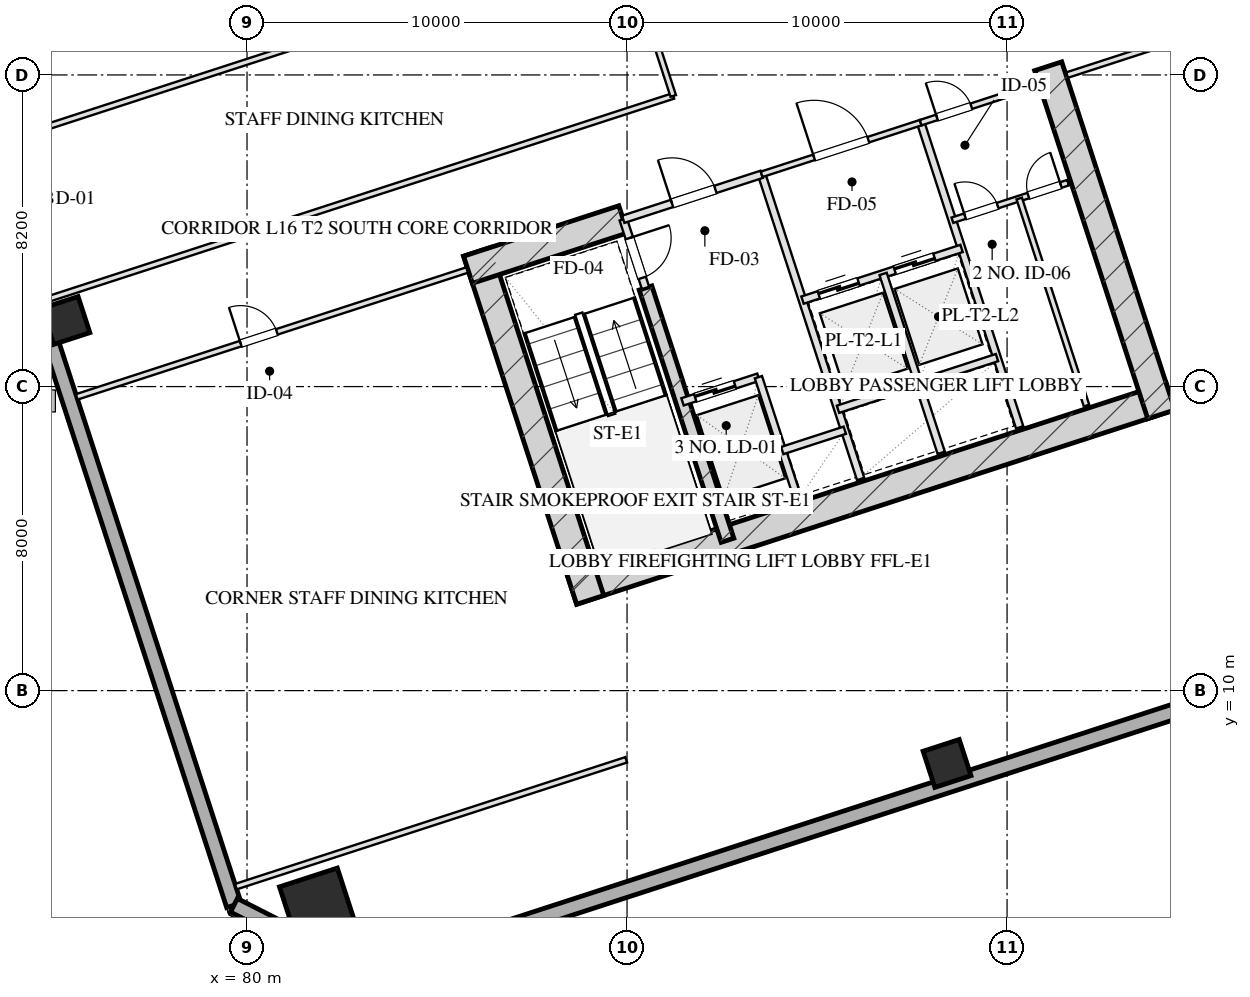
"""IFC4 building model, lengths in metres.
Left out: names, types, materials, properties, quantities, classifications, styles, units other than length and angle.
Written with IfcOpenShell. Run it as: python <this file> out.ifc"""

import sys

from ifc_helpers import new_model, si_unit, direction, frame, frame_2d, origin, origin_2d, place, context, subcontext, project, spatial, rectangle, hollow_rectangle, extrude, element, fill, save


model = new_model("IFC4")
c1 = context("Model", 3, precision=1e-05, world=origin(), true_north=direction((0.0, 1.0)))
c2 = subcontext(c1, "Body", "Model", "MODEL_VIEW")
j1 = project(units=[si_unit("LENGTHUNIT", "METRE"), si_unit("PLANEANGLEUNIT", "RADIAN")], contexts=[c1])
p1 = place(None, origin())
s1 = spatial("IfcSite", under=j1, at=p1, CompositionType="ELEMENT")
p2 = place(p1, origin())
s2 = spatial("IfcBuilding", under=s1, at=p2, CompositionType="ELEMENT")
p3 = place(p2, frame((0.0, 0.0, 67.85)))
s3 = spatial("IfcBuildingStorey", under=s2, at=p3, CompositionType="ELEMENT", Elevation=67.85)
p4 = place(p3, frame((88.559, 12.629, 0.0), z_axis=(0.0, 0.0, 1.0), x_axis=(0.951056072937, 0.309018358888, 0.0)))
e1 = element("IfcWall", 1, at=p4, inside=s3, PredefinedType="SHEAR", context=c2, shape_type="SweptSolid", body=[
    extrude(rectangle(XDim=16.55, YDim=0.75, at=frame_2d((8.275, 0.0))), origin(), (0.0, 0.0, 1.0), 3.45),
])
p5 = place(p3, frame((86.055, 21.546, 0.0), z_axis=(0.0, 0.0, 1.0), x_axis=(0.309023585745, -0.951054374604, 0.0)))
e2 = element("IfcWall", 2, at=p5, inside=s3, PredefinedType="SHEAR", context=c2, shape_type="SweptSolid", body=[
    extrude(rectangle(XDim=9.63, YDim=0.75, at=frame_2d((4.815, 0.0))), origin(), (0.0, 0.0, 1.0), 3.45),
])
p6 = place(p3, frame((101.082, 26.429, 0.0), z_axis=(0.0, 0.0, 1.0), x_axis=(0.309016134813, -0.951056795583, 0.0)))
e3 = element("IfcWall", 3, at=p6, inside=s3, PredefinedType="SHEAR", context=c2, shape_type="SweptSolid", body=[
    extrude(rectangle(XDim=9.63, YDim=0.75, at=frame_2d((4.815, 0.0))), origin(), (0.0, 0.0, 1.0), 3.45),
])
p7 = place(p3, frame((90.486, 20.594, 0.0), z_axis=(0.0, 0.0, 1.0), x_axis=(0.309020428229, -0.951055400562, 0.0)))
e4 = element("IfcWall", 4, at=p7, inside=s3, PredefinedType="SHEAR", context=c2, shape_type="SweptSolid", body=[
    extrude(rectangle(XDim=6.98, YDim=0.35, at=frame_2d((3.49, 0.0))), origin(), (0.0, 0.0, 1.0), 3.45),
])
p8 = place(p3, frame((85.814, 21.074, 0.0), z_axis=(0.0, 0.0, 1.0), x_axis=(0.95106580992, 0.308988390074, 0.0)))
e5 = element("IfcWall", 5, at=p8, inside=s3, PredefinedType="SHEAR", context=c2, shape_type="SweptSolid", body=[
    extrude(rectangle(XDim=4.295, YDim=0.75, at=frame_2d((2.147, 0.0))), origin(), (0.0, 0.0, 1.0), 3.45),
])
p9 = place(p3, frame((81.863, 4.323, 0.0), z_axis=(0.0, 0.0, 1.0), x_axis=(0.951056516295, 0.309016994375, 0.0)))
e6 = element("IfcColumn", 6, at=p9, inside=s3, PredefinedType="COLUMN", context=c2, shape_type="SweptSolid", body=[
    extrude(hollow_rectangle(XDim=1.6, YDim=1.6, WallThickness=0.055, at=origin_2d()), origin(), (0.0, 0.0, 1.0), 3.451),
])
for number, where, z_axis, x_axis in (
    (7, (75.234, 19.739, 0.0), (0.0, 0.0, 1.0), (0.951, 0.309, 0.0)),
    (8, (98.421, 8.084, 0.0), (0.0, 0.0, 1.0), (0.951, 0.309, 0.0)),
):
    element("IfcColumn", number, at=place(p3, frame(where, z_axis=z_axis, x_axis=x_axis)), inside=s3, PredefinedType="COLUMN", context=c2, shape_type="SweptSolid", body=[
        extrude(hollow_rectangle(XDim=1.0, YDim=1.0, WallThickness=0.036, at=origin_2d()), origin(), (0.0, 0.0, 1.0), 3.451),
    ])
p10 = place(p3, frame((79.655, 4.352, 0.0), z_axis=(0.0, 0.0, 1.0), x_axis=(-0.309014526607, 0.951057318118, 0.0)))
e9 = element("IfcWall", 9, at=p10, inside=s3, PredefinedType="SOLIDWALL", context=c2, shape_type="SweptSolid", body=[
    extrude(rectangle(XDim=50.0, YDim=0.4, at=frame_2d((25.0, 0.0))), origin(), (0.0, 0.0, 1.0), 2.61),
])
p11 = place(p10, frame((30.15, 0.0, 0.75)))
e10 = element("IfcOpeningElement", 10, at=p11, cuts=e9, PredefinedType="OPENING", context=c2, shape_type="SweptSolid", body=[
    extrude(rectangle(XDim=2.5, YDim=1.46, at=frame_2d((1.25, 0.73))), frame((0.0, 0.21, 0.0), z_axis=(0.0, -1.0, 0.0), x_axis=(1.0, 0.0, 0.0)), (0.0, 0.0, 1.0), 0.42),
])
p12 = place(p10, frame((18.65, 0.0, 0.0)))
e11 = element("IfcOpeningElement", 11, at=p12, cuts=e9, PredefinedType="OPENING", context=c2, shape_type="SweptSolid", body=[
    extrude(rectangle(XDim=1.1, YDim=2.15, at=frame_2d((0.55, 1.075))), frame((0.0, 0.21, 0.0), z_axis=(0.0, -1.0, 0.0), x_axis=(1.0, 0.0, 0.0)), (0.0, 0.0, 1.0), 0.42),
])
p13 = place(p3, frame((100.345, 63.648, 0.0), z_axis=(0.0, 0.0, 1.0), x_axis=(0.309014526607, -0.951057318118, 0.0)))
e12 = element("IfcWall", 12, at=p13, inside=s3, PredefinedType="SOLIDWALL", context=c2, shape_type="SweptSolid", body=[
    extrude(rectangle(XDim=50.0, YDim=0.4, at=frame_2d((25.0, 0.0))), origin(), (0.0, 0.0, 1.0), 2.61),
])
p14 = place(p13, frame((21.15, 0.0, 0.75)))
e13 = element("IfcOpeningElement", 13, at=p14, cuts=e12, PredefinedType="OPENING", context=c2, shape_type="SweptSolid", body=[
    extrude(rectangle(XDim=2.5, YDim=1.46, at=frame_2d((1.25, 0.73))), frame((0.0, 0.21, 0.0), z_axis=(0.0, -1.0, 0.0), x_axis=(1.0, 0.0, 0.0)), (0.0, 0.0, 1.0), 0.42),
])
p15 = place(p13, frame((17.35, 0.0, 0.75)))
e14 = element("IfcOpeningElement", 14, at=p15, cuts=e12, PredefinedType="OPENING", context=c2, shape_type="SweptSolid", body=[
    extrude(rectangle(XDim=2.5, YDim=1.46, at=frame_2d((1.25, 0.73))), frame((0.0, 0.21, 0.0), z_axis=(0.0, -1.0, 0.0), x_axis=(1.0, 0.0, 0.0)), (0.0, 0.0, 1.0), 0.42),
])
p16 = place(p13, frame((30.255, 0.0, 0.0)))
e15 = element("IfcOpeningElement", 15, at=p16, cuts=e12, PredefinedType="OPENING", context=c2, shape_type="SweptSolid", body=[
    extrude(rectangle(XDim=1.1, YDim=2.15, at=frame_2d((0.55, 1.075))), frame((0.0, 0.21, 0.0), z_axis=(0.0, -1.0, 0.0), x_axis=(1.0, 0.0, 0.0)), (0.0, 0.0, 1.0), 0.42),
])
p17 = place(p3, frame((113.998, 12.567, 0.0), z_axis=(0.0, 0.0, 1.0), x_axis=(-0.951055939317, -0.309018770125, 0.0)))
e16 = element("IfcWall", 16, at=p17, inside=s3, PredefinedType="SOLIDWALL", context=c2, shape_type="SweptSolid", body=[
    extrude(rectangle(XDim=32.4, YDim=0.4, at=frame_2d((16.2, 0.0))), origin(), (0.0, 0.0, 1.0), 2.61),
])
p18 = place(p3, frame((83.184, 2.554, 0.0), z_axis=(0.0, 0.0, 1.0), x_axis=(-0.890998089617, 0.454007053137, 0.0)))
e17 = element("IfcWall", 17, at=p18, inside=s3, PredefinedType="SOLIDWALL", context=c2, shape_type="SweptSolid", body=[
    extrude(rectangle(XDim=3.96, YDim=0.4, at=frame_2d((1.98, 0.0))), origin(), (0.0, 0.0, 1.0), 2.61),
])
p19 = place(p3, frame((89.899, 22.401, 0.0), z_axis=(0.0, 0.0, 1.0), x_axis=(0.308932062672, -0.951084108086, 0.0)))
e18 = element("IfcWall", 18, at=p19, inside=s3, PredefinedType="PARTITIONING", context=c2, shape_type="SweptSolid", body=[
    extrude(rectangle(XDim=1.9, YDim=0.2, at=frame_2d((0.95, 0.0))), origin(), (0.0, 0.0, 1.0), 3.175),
])
p20 = place(p19, frame((0.52, 0.0, 0.0)))
e19 = element("IfcOpeningElement", 19, at=p20, cuts=e18, PredefinedType="OPENING", context=c2, shape_type="SweptSolid", body=[
    extrude(rectangle(XDim=1.1, YDim=2.05, at=frame_2d((0.55, 1.025))), frame((0.0, 0.11, 0.0), z_axis=(0.0, -1.0, 0.0), x_axis=(1.0, 0.0, 0.0)), (0.0, 0.0, 1.0), 0.22),
])
p21 = place(p3, frame((93.542, 23.585, 0.0), z_axis=(0.0, 0.0, 1.0), x_axis=(0.309042196757, -0.951048327176, 0.0)))
e20 = element("IfcWall", 20, at=p21, inside=s3, PredefinedType="PARTITIONING", context=c2, shape_type="SweptSolid", body=[
    extrude(rectangle(XDim=8.43, YDim=0.2, at=frame_2d((4.215, 0.0))), origin(), (0.0, 0.0, 1.0), 3.175),
])
p22 = place(p3, frame((89.899, 22.401, 0.0), z_axis=(0.0, 0.0, 1.0), x_axis=(0.951046716504, 0.309047153403, 0.0)))
e21 = element("IfcWall", 21, at=p22, inside=s3, PredefinedType="PARTITIONING", context=c2, shape_type="SweptSolid", body=[
    extrude(rectangle(XDim=3.83, YDim=0.2, at=frame_2d((1.915, 0.0))), origin(), (0.0, 0.0, 1.0), 3.175),
])
p23 = place(p22, frame((1.35, 0.0, 0.0)))
e22 = element("IfcOpeningElement", 22, at=p23, cuts=e21, PredefinedType="OPENING", context=c2, shape_type="SweptSolid", body=[
    extrude(rectangle(XDim=1.2, YDim=2.05, at=frame_2d((0.6, 1.025))), frame((0.0, 0.11, 0.0), z_axis=(0.0, -1.0, 0.0), x_axis=(1.0, 0.0, 0.0)), (0.0, 0.0, 1.0), 0.22),
])
p24 = place(p3, frame((91.46, 17.598, 0.0), z_axis=(0.0, 0.0, 1.0), x_axis=(0.951062257173, 0.308999325213, 0.0)))
e23 = element("IfcWall", 23, at=p24, inside=s3, PredefinedType="PARTITIONING", context=c2, shape_type="SweptSolid", body=[
    extrude(rectangle(XDim=2.1, YDim=0.2, at=frame_2d((1.05, 0.0))), origin(), (0.0, 0.0, 1.0), 3.175),
])
p25 = place(p24, frame((0.35, 0.0, 0.0)))
e24 = element("IfcOpeningElement", 24, at=p25, cuts=e23, PredefinedType="OPENING", context=c2, shape_type="SweptSolid", body=[
    extrude(rectangle(XDim=1.1, YDim=2.05, at=frame_2d((0.55, 1.025))), frame((0.0, 0.11, 0.0), z_axis=(0.0, -1.0, 0.0), x_axis=(1.0, 0.0, 0.0)), (0.0, 0.0, 1.0), 0.22),
])
p26 = place(p3, frame((93.457, 18.247, 0.0), z_axis=(0.0, 0.0, 1.0), x_axis=(0.3089935693, -0.951064127245, 0.0)))
e25 = element("IfcWall", 25, at=p26, inside=s3, PredefinedType="PARTITIONING", context=c2, shape_type="SweptSolid", body=[
    extrude(rectangle(XDim=3.7, YDim=0.2, at=frame_2d((1.85, 0.0))), origin(), (0.0, 0.0, 1.0), 3.175),
])
p27 = place(p3, frame((94.084, 16.317, 0.0), z_axis=(0.0, 0.0, 1.0), x_axis=(0.951041328149, 0.309063734775, 0.0)))
e26 = element("IfcWall", 26, at=p27, inside=s3, PredefinedType="PARTITIONING", context=c2, shape_type="SweptSolid", body=[
    extrude(rectangle(XDim=1.73, YDim=0.2, at=frame_2d((0.865, 0.0))), origin(), (0.0, 0.0, 1.0), 3.175),
])
p28 = place(p3, frame((97.727, 24.944, 0.0), z_axis=(0.0, 0.0, 1.0), x_axis=(0.309016001439, -0.951056838919, 0.0)))
e27 = element("IfcWall", 27, at=p28, inside=s3, PredefinedType="PARTITIONING", context=c2, shape_type="SweptSolid", body=[
    extrude(rectangle(XDim=8.43, YDim=0.2, at=frame_2d((4.215, 0.0))), origin(), (0.0, 0.0, 1.0), 3.175),
])
p29 = place(p3, frame((93.542, 23.585, 0.0), z_axis=(0.0, 0.0, 1.0), x_axis=(0.951063829732, 0.308994485023, 0.0)))
e28 = element("IfcWall", 28, at=p29, inside=s3, PredefinedType="PARTITIONING", context=c2, shape_type="SweptSolid", body=[
    extrude(rectangle(XDim=4.4, YDim=0.15, at=frame_2d((2.2, 0.0))), origin(), (0.0, 0.0, 1.0), 3.175),
])
p30 = place(p29, frame((1.45, 0.0, 0.0)))
e29 = element("IfcOpeningElement", 29, at=p30, cuts=e28, PredefinedType="OPENING", context=c2, shape_type="SweptSolid", body=[
    extrude(rectangle(XDim=1.5, YDim=2.05, at=frame_2d((0.75, 1.025))), frame((0.0, 0.085, 0.0), z_axis=(0.0, -1.0, 0.0), x_axis=(1.0, 0.0, 0.0)), (0.0, 0.0, 1.0), 0.17),
])
p31 = place(p3, frame((94.617, 20.275, 0.0), z_axis=(0.0, 0.0, 1.0), x_axis=(0.951058531764, 0.30901079133, 0.0)))
e30 = element("IfcWall", 30, at=p31, inside=s3, PredefinedType="PARTITIONING", context=c2, shape_type="SweptSolid", body=[
    extrude(rectangle(XDim=4.4, YDim=0.2, at=frame_2d((2.2, 0.0))), origin(), (0.0, 0.0, 1.0), 3.175),
])
p32 = place(p31, frame((0.45, 0.0, 0.0)))
e31 = element("IfcOpeningElement", 31, at=p32, cuts=e30, PredefinedType="OPENING", context=c2, shape_type="SweptSolid", body=[
    extrude(rectangle(XDim=1.1, YDim=2.05, at=frame_2d((0.55, 1.025))), frame((0.0, 0.11, 0.0), z_axis=(0.0, -1.0, 0.0), x_axis=(1.0, 0.0, 0.0)), (0.0, 0.0, 1.0), 0.22),
])
p33 = place(p31, frame((2.55, 0.0, 0.0)))
e32 = element("IfcOpeningElement", 32, at=p33, cuts=e30, PredefinedType="OPENING", context=c2, shape_type="SweptSolid", body=[
    extrude(rectangle(XDim=1.1, YDim=2.05, at=frame_2d((0.55, 1.025))), frame((0.0, 0.11, 0.0), z_axis=(0.0, -1.0, 0.0), x_axis=(1.0, 0.0, 0.0)), (0.0, 0.0, 1.0), 0.22),
])
p34 = place(p3, frame((96.738, 20.964, 0.0), z_axis=(0.0, 0.0, 1.0), x_axis=(0.309042578481, -0.951048203135, 0.0)))
e33 = element("IfcWall", 33, at=p34, inside=s3, PredefinedType="PARTITIONING", context=c2, shape_type="SweptSolid", body=[
    extrude(rectangle(XDim=4.95, YDim=0.2, at=frame_2d((2.475, 0.0))), origin(), (0.0, 0.0, 1.0), 3.175),
])
p35 = place(p3, frame((95.551, 17.403, 0.0), z_axis=(0.0, 0.0, 1.0), x_axis=(0.951058531764, 0.30901079133, 0.0)))
e34 = element("IfcWall", 34, at=p35, inside=s3, PredefinedType="PARTITIONING", context=c2, shape_type="SweptSolid", body=[
    extrude(rectangle(XDim=4.4, YDim=0.2, at=frame_2d((2.2, 0.0))), origin(), (0.0, 0.0, 1.0), 3.175),
])
p36 = place(p3, frame((97.727, 24.944, 0.0), z_axis=(0.0, 0.0, 1.0), x_axis=(0.951036872128, 0.309077446369, 0.0)))
e35 = element("IfcWall", 35, at=p36, inside=s3, PredefinedType="PARTITIONING", context=c2, shape_type="SweptSolid", body=[
    extrude(rectangle(XDim=3.2, YDim=0.15, at=frame_2d((1.6, 0.0))), origin(), (0.0, 0.0, 1.0), 3.175),
])
p37 = place(p36, frame((0.45, 0.0, 0.0)))
e36 = element("IfcOpeningElement", 36, at=p37, cuts=e35, PredefinedType="OPENING", context=c2, shape_type="SweptSolid", body=[
    extrude(rectangle(XDim=0.95, YDim=2.05, at=frame_2d((0.475, 1.025))), frame((0.0, 0.085, 0.0), z_axis=(0.0, -1.0, 0.0), x_axis=(1.0, 0.0, 0.0)), (0.0, 0.0, 1.0), 0.17),
])
p38 = place(p3, frame((98.561, 22.376, 0.0), z_axis=(0.0, 0.0, 1.0), x_axis=(0.95104415986, 0.309055020985, 0.0)))
e37 = element("IfcWall", 37, at=p38, inside=s3, PredefinedType="PARTITIONING", context=c2, shape_type="SweptSolid", body=[
    extrude(rectangle(XDim=3.2, YDim=0.15, at=frame_2d((1.6, 0.0))), origin(), (0.0, 0.0, 1.0), 3.175),
])
p39 = place(p38, frame((0.35, 0.0, 0.0)))
e38 = element("IfcOpeningElement", 38, at=p39, cuts=e37, PredefinedType="OPENING", context=c2, shape_type="SweptSolid", body=[
    extrude(rectangle(XDim=0.9, YDim=2.05, at=frame_2d((0.45, 1.025))), frame((0.0, 0.085, 0.0), z_axis=(0.0, -1.0, 0.0), x_axis=(1.0, 0.0, 0.0)), (0.0, 0.0, 1.0), 0.17),
])
p40 = place(p38, frame((2.1, 0.0, 0.0)))
e39 = element("IfcOpeningElement", 39, at=p40, cuts=e37, PredefinedType="OPENING", context=c2, shape_type="SweptSolid", body=[
    extrude(rectangle(XDim=0.9, YDim=2.05, at=frame_2d((0.45, 1.025))), frame((0.0, 0.085, 0.0), z_axis=(0.0, -1.0, 0.0), x_axis=(1.0, 0.0, 0.0)), (0.0, 0.0, 1.0), 0.17),
])
p41 = place(p3, frame((100.32, 22.948, 0.0), z_axis=(0.0, 0.0, 1.0), x_axis=(0.309035009867, -0.951050662518, 0.0)))
e40 = element("IfcWall", 40, at=p41, inside=s3, PredefinedType="PARTITIONING", context=c2, shape_type="SweptSolid", body=[
    extrude(rectangle(XDim=5.73, YDim=0.15, at=frame_2d((2.865, 0.0))), origin(), (0.0, 0.0, 1.0), 3.175),
])
p42 = place(p3, frame((79.707, 4.842, 0.0), z_axis=(0.0, 0.0, 1.0), x_axis=(0.951056658866, 0.309016555588, 0.0)))
e41 = element("IfcWall", 41, at=p42, inside=s3, PredefinedType="PARTITIONING", context=c2, shape_type="SweptSolid", body=[
    extrude(rectangle(XDim=10.8, YDim=0.15, at=frame_2d((5.4, 0.0))), origin(), (0.0, 0.0, 1.0), 3.175),
])
p43 = place(p3, frame((75.519, 17.729, 0.0), z_axis=(0.0, 0.0, 1.0), x_axis=(0.951056658866, 0.309016555588, 0.0)))
e42 = element("IfcWall", 42, at=p43, inside=s3, PredefinedType="PARTITIONING", context=c2, shape_type="SweptSolid", body=[
    extrude(rectangle(XDim=10.8, YDim=0.15, at=frame_2d((5.4, 0.0))), origin(), (0.0, 0.0, 1.0), 3.175),
])
p44 = place(p43, frame((4.536, 0.0, 0.0)))
e43 = element("IfcOpeningElement", 43, at=p44, cuts=e42, PredefinedType="OPENING", context=c2, shape_type="SweptSolid", body=[
    extrude(rectangle(XDim=1.0, YDim=2.05, at=frame_2d((0.5, 1.025))), frame((0.0, 0.085, 0.0), z_axis=(0.0, -1.0, 0.0), x_axis=(1.0, 0.0, 0.0)), (0.0, 0.0, 1.0), 0.17),
])
p45 = place(p3, frame((101.578, 26.196, 0.0), z_axis=(0.0, 0.0, 1.0), x_axis=(0.951059043131, 0.309009217467, 0.0)))
e44 = element("IfcWall", 44, at=p45, inside=s3, PredefinedType="PARTITIONING", context=c2, shape_type="SweptSolid", body=[
    extrude(rectangle(XDim=10.2, YDim=0.15, at=frame_2d((5.1, 0.0))), origin(), (0.0, 0.0, 1.0), 3.175),
])
p46 = place(p45, frame((4.284, 0.0, 0.0)))
e45 = element("IfcOpeningElement", 45, at=p46, cuts=e44, PredefinedType="OPENING", context=c2, shape_type="SweptSolid", body=[
    extrude(rectangle(XDim=1.05, YDim=2.05, at=frame_2d((0.525, 1.025))), frame((0.0, 0.085, 0.0), z_axis=(0.0, -1.0, 0.0), x_axis=(1.0, 0.0, 0.0)), (0.0, 0.0, 1.0), 0.17),
])
p47 = place(p3, frame((74.691, 20.278, 0.0), z_axis=(0.0, 0.0, 1.0), x_axis=(0.951053169828, 0.309027293551, 0.0)))
e46 = element("IfcWall", 46, at=p47, inside=s3, PredefinedType="PARTITIONING", context=c2, shape_type="SweptSolid", body=[
    extrude(rectangle(XDim=17.375, YDim=0.15, at=frame_2d((8.688, 0.0))), origin(), (0.0, 0.0, 1.0), 3.175),
])
p48 = place(p3, frame((91.216, 25.647, 0.0), z_axis=(0.0, 0.0, 1.0), x_axis=(-0.309022042254, 0.951054876125, 0.0)))
e47 = element("IfcWall", 47, at=p48, inside=s3, PredefinedType="PARTITIONING", context=c2, shape_type="SweptSolid", body=[
    extrude(rectangle(XDim=16.64, YDim=0.15, at=frame_2d((8.32, 0.0))), origin(), (0.0, 0.0, 1.0), 3.175),
])
p49 = place(p48, frame((1.66, 0.0, 0.0)))
e48 = element("IfcOpeningElement", 48, at=p49, cuts=e47, PredefinedType="OPENING", context=c2, shape_type="SweptSolid", body=[
    extrude(rectangle(XDim=1.0, YDim=2.05, at=frame_2d((0.5, 1.025))), frame((0.0, 0.085, 0.0), z_axis=(0.0, -1.0, 0.0), x_axis=(1.0, 0.0, 0.0)), (0.0, 0.0, 1.0), 0.17),
])
p50 = place(p48, frame((7.82, 0.0, 0.0)))
e49 = element("IfcOpeningElement", 49, at=p50, cuts=e47, PredefinedType="OPENING", context=c2, shape_type="SweptSolid", body=[
    extrude(rectangle(XDim=1.0, YDim=2.05, at=frame_2d((0.5, 1.025))), frame((0.0, 0.085, 0.0), z_axis=(0.0, -1.0, 0.0), x_axis=(1.0, 0.0, 0.0)), (0.0, 0.0, 1.0), 0.17),
])
p51 = place(p48, frame((13.98, 0.0, 0.0)))
e50 = element("IfcOpeningElement", 50, at=p51, cuts=e47, PredefinedType="OPENING", context=c2, shape_type="SweptSolid", body=[
    extrude(rectangle(XDim=1.0, YDim=2.05, at=frame_2d((0.5, 1.025))), frame((0.0, 0.085, 0.0), z_axis=(0.0, -1.0, 0.0), x_axis=(1.0, 0.0, 0.0)), (0.0, 0.0, 1.0), 0.17),
])
p52 = place(p3, frame((73.356, 24.386, 0.0), z_axis=(0.0, 0.0, 1.0), x_axis=(0.951057299418, 0.309014584159, 0.0)))
e51 = element("IfcWall", 51, at=p52, inside=s3, PredefinedType="PARTITIONING", context=c2, shape_type="SweptSolid", body=[
    extrude(rectangle(XDim=17.375, YDim=0.15, at=frame_2d((8.688, 0.0))), origin(), (0.0, 0.0, 1.0), 3.175),
])
p53 = place(p20, origin())
e52 = element("IfcDoor", 52, at=p53, inside=s3, OperationType="SINGLE_SWING_LEFT", PredefinedType="DOOR", context=c2, shape_type="SweptSolid", body=[
    extrude(rectangle(XDim=1.1, YDim=2.05, at=frame_2d((0.55, 1.025))), frame((0.0, 0.025, 0.0), z_axis=(0.0, -1.0, 0.0), x_axis=(1.0, 0.0, 0.0)), (0.0, 0.0, 1.0), 0.05),
])
fill(e19, e52)
p54 = place(p23, origin())
e53 = element("IfcDoor", 53, at=p54, inside=s3, OperationType="SINGLE_SWING_LEFT", PredefinedType="DOOR", context=c2, shape_type="SweptSolid", body=[
    extrude(rectangle(XDim=1.2, YDim=2.05, at=frame_2d((0.6, 1.025))), frame((0.0, 0.025, 0.0), z_axis=(0.0, -1.0, 0.0), x_axis=(1.0, 0.0, 0.0)), (0.0, 0.0, 1.0), 0.05),
])
fill(e22, e53)
p55 = place(p25, origin())
e54 = element("IfcDoor", 54, at=p55, inside=s3, OperationType="DOUBLE_DOOR_SLIDING", PredefinedType="DOOR", context=c2, shape_type="SweptSolid", body=[
    extrude(rectangle(XDim=1.1, YDim=2.05, at=frame_2d((0.55, 1.025))), frame((0.0, 0.025, 0.0), z_axis=(0.0, -1.0, 0.0), x_axis=(1.0, 0.0, 0.0)), (0.0, 0.0, 1.0), 0.05),
])
fill(e24, e54)
p56 = place(p30, origin())
e55 = element("IfcDoor", 55, at=p56, inside=s3, OperationType="SINGLE_SWING_LEFT", PredefinedType="DOOR", context=c2, shape_type="SweptSolid", body=[
    extrude(rectangle(XDim=1.5, YDim=2.05, at=frame_2d((0.75, 1.025))), frame((0.0, 0.025, 0.0), z_axis=(0.0, -1.0, 0.0), x_axis=(1.0, 0.0, 0.0)), (0.0, 0.0, 1.0), 0.05),
])
fill(e29, e55)
p57 = place(p32, origin())
e56 = element("IfcDoor", 56, at=p57, inside=s3, OperationType="DOUBLE_DOOR_SLIDING", PredefinedType="DOOR", context=c2, shape_type="SweptSolid", body=[
    extrude(rectangle(XDim=1.1, YDim=2.05, at=frame_2d((0.55, 1.025))), frame((0.0, 0.025, 0.0), z_axis=(0.0, -1.0, 0.0), x_axis=(1.0, 0.0, 0.0)), (0.0, 0.0, 1.0), 0.05),
])
fill(e31, e56)
p58 = place(p33, origin())
e57 = element("IfcDoor", 57, at=p58, inside=s3, OperationType="DOUBLE_DOOR_SLIDING", PredefinedType="DOOR", context=c2, shape_type="SweptSolid", body=[
    extrude(rectangle(XDim=1.1, YDim=2.05, at=frame_2d((0.55, 1.025))), frame((0.0, 0.025, 0.0), z_axis=(0.0, -1.0, 0.0), x_axis=(1.0, 0.0, 0.0)), (0.0, 0.0, 1.0), 0.05),
])
fill(e32, e57)
p59 = place(p37, origin())
e58 = element("IfcDoor", 58, at=p59, inside=s3, OperationType="SINGLE_SWING_LEFT", PredefinedType="DOOR", context=c2, shape_type="SweptSolid", body=[
    extrude(rectangle(XDim=0.95, YDim=2.05, at=frame_2d((0.475, 1.025))), frame((0.0, 0.025, 0.0), z_axis=(0.0, -1.0, 0.0), x_axis=(1.0, 0.0, 0.0)), (0.0, 0.0, 1.0), 0.05),
])
fill(e36, e58)
p60 = place(p39, origin())
e59 = element("IfcDoor", 59, at=p60, inside=s3, OperationType="SINGLE_SWING_LEFT", PredefinedType="DOOR", context=c2, shape_type="SweptSolid", body=[
    extrude(rectangle(XDim=0.9, YDim=2.05, at=frame_2d((0.45, 1.025))), frame((0.0, 0.025, 0.0), z_axis=(0.0, -1.0, 0.0), x_axis=(1.0, 0.0, 0.0)), (0.0, 0.0, 1.0), 0.05),
])
fill(e38, e59)
p61 = place(p40, origin())
e60 = element("IfcDoor", 60, at=p61, inside=s3, OperationType="SINGLE_SWING_RIGHT", PredefinedType="DOOR", context=c2, shape_type="SweptSolid", body=[
    extrude(rectangle(XDim=0.9, YDim=2.05, at=frame_2d((0.45, 1.025))), frame((0.0, 0.025, 0.0), z_axis=(0.0, -1.0, 0.0), x_axis=(1.0, 0.0, 0.0)), (0.0, 0.0, 1.0), 0.05),
])
fill(e39, e60)
p62 = place(p44, origin())
e61 = element("IfcDoor", 61, at=p62, inside=s3, OperationType="SINGLE_SWING_LEFT", PredefinedType="DOOR", context=c2, shape_type="SweptSolid", body=[
    extrude(rectangle(XDim=1.0, YDim=2.05, at=frame_2d((0.5, 1.025))), frame((0.0, 0.025, 0.0), z_axis=(0.0, -1.0, 0.0), x_axis=(1.0, 0.0, 0.0)), (0.0, 0.0, 1.0), 0.05),
])
fill(e43, e61)
save(model, sys.argv[1])
